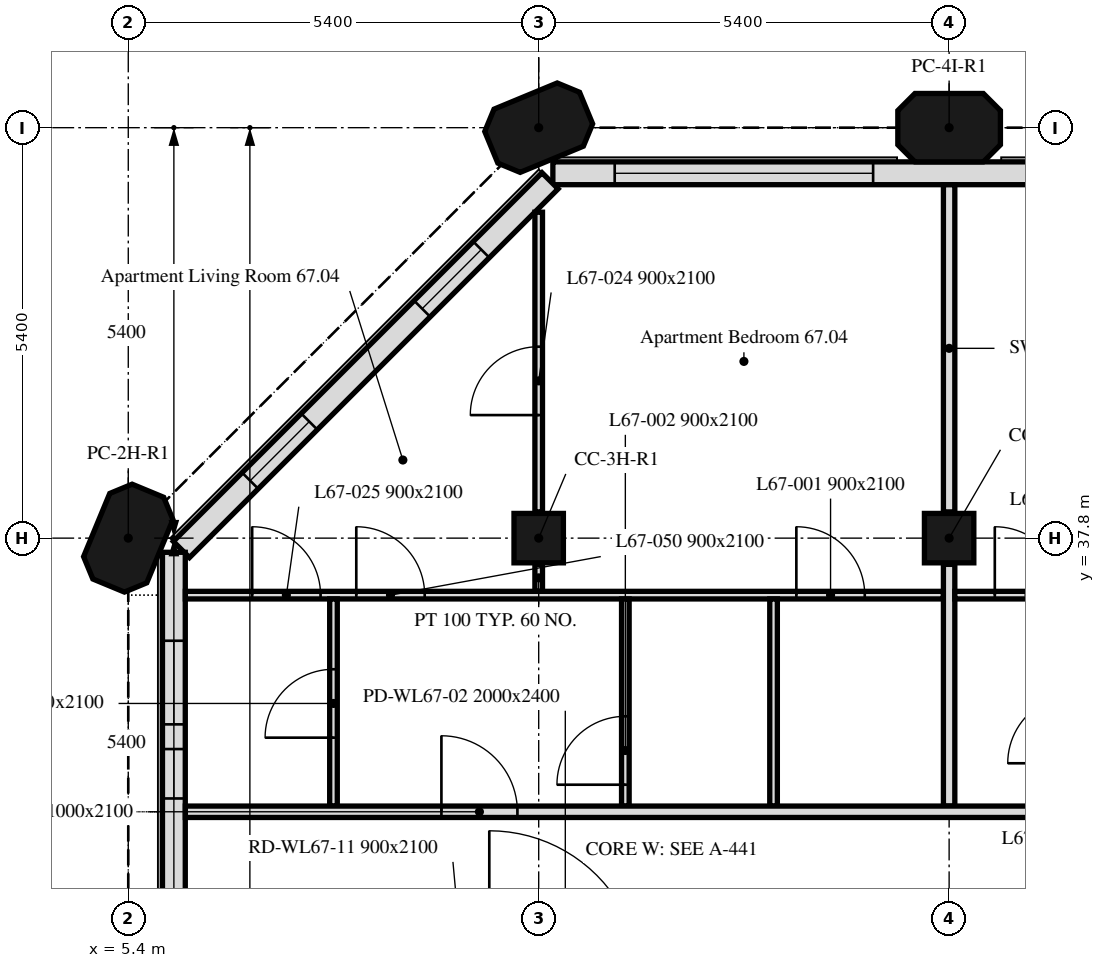
"""IFC4 building model, lengths in metres.
Left out: names, types, materials, properties, quantities, classifications, styles, units other than length and angle.
Written with IfcOpenShell. Run it as: python <this file> out.ifc"""

import sys

from ifc_helpers import new_model, si_unit, direction, frame, frame_2d, origin, origin_2d, place, context, subcontext, project, spatial, polyline, rectangle, outline, extrude, element, fill, save


model = new_model("IFC4")
c1 = context("Model", 3, precision=1e-05, world=origin(), true_north=direction((0.0, 1.0)))
c2 = subcontext(c1, "Body", "Model", "MODEL_VIEW")
j1 = project(units=[si_unit("LENGTHUNIT", "METRE"), si_unit("PLANEANGLEUNIT", "RADIAN")], contexts=[c1])
p1 = place(None, origin())
s1 = spatial("IfcSite", under=j1, at=p1, CompositionType="ELEMENT")
p2 = place(p1, origin())
s2 = spatial("IfcBuilding", under=s1, at=p2, CompositionType="ELEMENT")
p3 = place(p2, frame((0.0, 0.0, 275.2)))
s3 = spatial("IfcBuildingStorey", under=s2, at=p3, CompositionType="ELEMENT", Elevation=275.2)
p4 = place(p3, frame((5.4, 37.8, 0.0), z_axis=(0.0, 0.0, 1.0), x_axis=(0.382683432365, 0.923879532511, 0.0)))
e1 = element("IfcColumn", 1, at=p4, inside=s3, PredefinedType="COLUMN", context=c2, shape_type="SweptSolid", body=[
    extrude(outline(polyline([(-0.45, -0.45), (0.45, -0.45), (0.675, -0.225), (0.675, 0.225), (0.45, 0.45), (-0.45, 0.45), (-0.675, 0.225), (-0.675, -0.225), (-0.45, -0.45)])), origin(), (0.0, 0.0, 1.0), 3.0),
])
for number, where, z_axis, x_axis in (
    (2, (10.8, 37.8, 0.0), (0.0, 0.0, 1.0), (1.0, 0.0, 0.0)),
    (3, (16.2, 37.8, 0.0), (0.0, 0.0, 1.0), (1.0, 0.0, 0.0)),
):
    element("IfcColumn", number, at=place(p3, frame(where, z_axis=z_axis, x_axis=x_axis)), inside=s3, PredefinedType="COLUMN", context=c2, shape_type="SweptSolid", body=[
        extrude(rectangle(XDim=0.65, YDim=0.65, at=origin_2d()), origin(), (0.0, 0.0, 1.0), 3.0),
    ])
for number, where, z_axis, x_axis in (
    (4, (10.8, 43.2, 0.0), (0.0, 0.0, 1.0), (0.924, 0.383, 0.0)),
    (5, (16.2, 43.2, 0.0), (0.0, 0.0, 1.0), (1.0, 0.0, 0.0)),
):
    element("IfcColumn", number, at=place(p3, frame(where, z_axis=z_axis, x_axis=x_axis)), inside=s3, PredefinedType="COLUMN", context=c2, shape_type="SweptSolid", body=[
        extrude(outline(polyline([(-0.45, -0.45), (0.45, -0.45), (0.675, -0.225), (0.675, 0.225), (0.45, 0.45), (-0.45, 0.45), (-0.675, 0.225), (-0.675, -0.225), (-0.45, -0.45)])), origin(), (0.0, 0.0, 1.0), 3.0),
    ])
p5 = place(p3, frame((43.014, 42.6, 0.0), z_axis=(0.0, 0.0, 1.0), x_axis=(-1.0, 0.0, 0.0)))
e6 = element("IfcWall", 6, at=p5, inside=s3, PredefinedType="SOLIDWALL", context=c2, shape_type="SweptSolid", body=[
    extrude(rectangle(XDim=32.027, YDim=0.3, at=frame_2d((16.014, 0.0))), origin(), (0.0, 0.0, 1.0), 3.0),
])
p6 = place(p5, frame((2.764, 0.0, 0.9)))
e7 = element("IfcOpeningElement", 7, at=p6, cuts=e6, PredefinedType="OPENING", context=c2, shape_type="SweptSolid", body=[
    extrude(rectangle(XDim=1.1, YDim=1.7, at=frame_2d((0.55, 0.85))), frame((0.0, 0.16, 0.0), z_axis=(0.0, -1.0, 0.0), x_axis=(1.0, 0.0, 0.0)), (0.0, 0.0, 1.0), 0.32),
])
p7 = place(p5, frame((6.214, 0.0, 0.9)))
e8 = element("IfcOpeningElement", 8, at=p7, cuts=e6, PredefinedType="OPENING", context=c2, shape_type="SweptSolid", body=[
    extrude(rectangle(XDim=3.4, YDim=1.7, at=frame_2d((1.7, 0.85))), frame((0.0, 0.16, 0.0), z_axis=(0.0, -1.0, 0.0), x_axis=(1.0, 0.0, 0.0)), (0.0, 0.0, 1.0), 0.32),
])
p8 = place(p5, frame((13.564, 0.0, 0.9)))
e9 = element("IfcOpeningElement", 9, at=p8, cuts=e6, PredefinedType="OPENING", context=c2, shape_type="SweptSolid", body=[
    extrude(rectangle(XDim=1.1, YDim=1.7, at=frame_2d((0.55, 0.85))), frame((0.0, 0.16, 0.0), z_axis=(0.0, -1.0, 0.0), x_axis=(1.0, 0.0, 0.0)), (0.0, 0.0, 1.0), 0.32),
])
p9 = place(p5, frame((17.014, 0.0, 0.9)))
e10 = element("IfcOpeningElement", 10, at=p9, cuts=e6, PredefinedType="OPENING", context=c2, shape_type="SweptSolid", body=[
    extrude(rectangle(XDim=3.4, YDim=1.7, at=frame_2d((1.7, 0.85))), frame((0.0, 0.16, 0.0), z_axis=(0.0, -1.0, 0.0), x_axis=(1.0, 0.0, 0.0)), (0.0, 0.0, 1.0), 0.32),
])
p10 = place(p5, frame((24.364, 0.0, 0.9)))
e11 = element("IfcOpeningElement", 11, at=p10, cuts=e6, PredefinedType="OPENING", context=c2, shape_type="SweptSolid", body=[
    extrude(rectangle(XDim=1.1, YDim=1.7, at=frame_2d((0.55, 0.85))), frame((0.0, 0.16, 0.0), z_axis=(0.0, -1.0, 0.0), x_axis=(1.0, 0.0, 0.0)), (0.0, 0.0, 1.0), 0.32),
])
p11 = place(p5, frame((27.814, 0.0, 0.9)))
e12 = element("IfcOpeningElement", 12, at=p11, cuts=e6, PredefinedType="OPENING", context=c2, shape_type="SweptSolid", body=[
    extrude(rectangle(XDim=3.4, YDim=1.7, at=frame_2d((1.7, 0.85))), frame((0.0, 0.16, 0.0), z_axis=(0.0, -1.0, 0.0), x_axis=(1.0, 0.0, 0.0)), (0.0, 0.0, 1.0), 0.32),
])
p12 = place(p3, frame((10.949, 42.501, 0.0), z_axis=(0.0, 0.0, 1.0), x_axis=(-0.707106781187, -0.707106781187, 0.0)))
e13 = element("IfcWall", 13, at=p12, inside=s3, PredefinedType="SOLIDWALL", context=c2, shape_type="SweptSolid", body=[
    extrude(rectangle(XDim=6.86, YDim=0.3, at=frame_2d((3.43, 0.0))), origin(), (0.0, 0.0, 1.0), 3.0),
])
p13 = place(p12, frame((1.28, 0.0, 0.9)))
e14 = element("IfcOpeningElement", 14, at=p13, cuts=e13, PredefinedType="OPENING", context=c2, shape_type="SweptSolid", body=[
    extrude(rectangle(XDim=1.1, YDim=1.7, at=frame_2d((0.55, 0.85))), frame((0.0, 0.16, 0.0), z_axis=(0.0, -1.0, 0.0), x_axis=(1.0, 0.0, 0.0)), (0.0, 0.0, 1.0), 0.32),
])
p14 = place(p12, frame((4.48, 0.0, 0.9)))
e15 = element("IfcOpeningElement", 15, at=p14, cuts=e13, PredefinedType="OPENING", context=c2, shape_type="SweptSolid", body=[
    extrude(rectangle(XDim=1.1, YDim=1.7, at=frame_2d((0.55, 0.85))), frame((0.0, 0.16, 0.0), z_axis=(0.0, -1.0, 0.0), x_axis=(1.0, 0.0, 0.0)), (0.0, 0.0, 1.0), 0.32),
])
p15 = place(p3, frame((6.0, 37.614, 0.0), z_axis=(0.0, 0.0, 1.0), x_axis=(0.0, -1.0, 0.0)))
e16 = element("IfcWall", 16, at=p15, inside=s3, PredefinedType="SOLIDWALL", context=c2, shape_type="SweptSolid", body=[
    extrude(rectangle(XDim=5.214, YDim=0.3, at=frame_2d((2.607, 0.0))), origin(), (0.0, 0.0, 1.0), 3.0),
])
p16 = place(p15, frame((1.164, 0.0, 0.9)))
e17 = element("IfcOpeningElement", 17, at=p16, cuts=e16, PredefinedType="OPENING", context=c2, shape_type="SweptSolid", body=[
    extrude(rectangle(XDim=1.1, YDim=1.7, at=frame_2d((0.55, 0.85))), frame((0.0, 0.16, 0.0), z_axis=(0.0, -1.0, 0.0), x_axis=(1.0, 0.0, 0.0)), (0.0, 0.0, 1.0), 0.32),
])
p17 = place(p15, frame((2.589, 0.0, 0.9)))
e18 = element("IfcOpeningElement", 18, at=p17, cuts=e16, PredefinedType="OPENING", context=c2, shape_type="SweptSolid", body=[
    extrude(rectangle(XDim=0.65, YDim=1.7, at=frame_2d((0.325, 0.85))), frame((0.0, 0.16, 0.0), z_axis=(0.0, -1.0, 0.0), x_axis=(1.0, 0.0, 0.0)), (0.0, 0.0, 1.0), 0.32),
])
p18 = place(p3, frame((10.8, 37.1, 0.0), z_axis=(0.0, 0.0, 1.0), x_axis=(0.0, 1.0, 0.0)))
e19 = element("IfcWall", 19, at=p18, inside=s3, PredefinedType="PARTITIONING", context=c2, shape_type="SweptSolid", body=[
    extrude(rectangle(XDim=0.355, YDim=0.1, at=frame_2d((0.177, 0.0))), origin(), (0.0, 0.0, 1.0), 3.0),
])
p19 = place(p3, frame((10.8, 38.145, 0.0), z_axis=(0.0, 0.0, 1.0), x_axis=(0.0, 1.0, 0.0)))
e20 = element("IfcWall", 20, at=p19, inside=s3, PredefinedType="PARTITIONING", context=c2, shape_type="SweptSolid", body=[
    extrude(rectangle(XDim=3.943, YDim=0.1, at=frame_2d((1.971, 0.0))), origin(), (0.0, 0.0, 1.0), 3.0),
])
p20 = place(p19, frame((1.274, 0.0, 0.0)))
e21 = element("IfcOpeningElement", 21, at=p20, cuts=e20, PredefinedType="OPENING", context=c2, shape_type="SweptSolid", body=[
    extrude(rectangle(XDim=0.9, YDim=2.1, at=frame_2d((0.45, 1.05))), frame((0.0, 0.05, 0.0), z_axis=(0.0, -1.0, 0.0), x_axis=(1.0, 0.0, 0.0)), (0.0, 0.0, 1.0), 0.1),
])
p21 = place(p3, frame((6.151, 37.05, 0.0), z_axis=(0.0, 0.0, 1.0), x_axis=(1.0, 0.0, 0.0)))
e22 = element("IfcWall", 22, at=p21, inside=s3, PredefinedType="PARTITIONING", context=c2, shape_type="SweptSolid", body=[
    extrude(rectangle(XDim=9.974, YDim=0.1, at=frame_2d((4.987, 0.0))), origin(), (0.0, 0.0, 1.0), 3.0),
])
p22 = place(p21, frame((8.039, 0.0, 0.0)))
e23 = element("IfcOpeningElement", 23, at=p22, cuts=e22, PredefinedType="OPENING", context=c2, shape_type="SweptSolid", body=[
    extrude(rectangle(XDim=0.9, YDim=2.1, at=frame_2d((0.45, 1.05))), frame((0.0, 0.05, 0.0), z_axis=(0.0, -1.0, 0.0), x_axis=(1.0, 0.0, 0.0)), (0.0, 0.0, 1.0), 0.1),
])
p23 = place(p21, frame((0.879, 0.0, 0.0)))
e24 = element("IfcOpeningElement", 24, at=p23, cuts=e22, PredefinedType="OPENING", context=c2, shape_type="SweptSolid", body=[
    extrude(rectangle(XDim=0.9, YDim=2.1, at=frame_2d((0.45, 1.05))), frame((0.0, 0.05, 0.0), z_axis=(0.0, -1.0, 0.0), x_axis=(1.0, 0.0, 0.0)), (0.0, 0.0, 1.0), 0.1),
])
p24 = place(p21, frame((2.249, 0.0, 0.0)))
e25 = element("IfcOpeningElement", 25, at=p24, cuts=e22, PredefinedType="OPENING", context=c2, shape_type="SweptSolid", body=[
    extrude(rectangle(XDim=0.9, YDim=2.1, at=frame_2d((0.45, 1.05))), frame((0.0, 0.05, 0.0), z_axis=(0.0, -1.0, 0.0), x_axis=(1.0, 0.0, 0.0)), (0.0, 0.0, 1.0), 0.1),
])
p25 = place(p3, frame((16.2, 38.145, 0.0), z_axis=(0.0, 0.0, 1.0), x_axis=(0.0, 1.0, 0.0)))
e26 = element("IfcWall", 26, at=p25, inside=s3, PredefinedType="PARTITIONING", context=c2, shape_type="SweptSolid", body=[
    extrude(rectangle(XDim=4.304, YDim=0.15, at=frame_2d((2.152, 0.0))), origin(), (0.0, 0.0, 1.0), 3.0),
])
p26 = place(p3, frame((8.1, 34.275, 0.0), z_axis=(0.0, 0.0, 1.0), x_axis=(0.0, 1.0, 0.0)))
e27 = element("IfcWall", 27, at=p26, inside=s3, PredefinedType="PARTITIONING", context=c2, shape_type="SweptSolid", body=[
    extrude(rectangle(XDim=2.725, YDim=0.1, at=frame_2d((1.363, 0.0))), origin(), (0.0, 0.0, 1.0), 3.0),
])
p27 = place(p26, frame((0.9, 0.0, 0.0)))
e28 = element("IfcOpeningElement", 28, at=p27, cuts=e27, PredefinedType="OPENING", context=c2, shape_type="SweptSolid", body=[
    extrude(rectangle(XDim=0.9, YDim=2.1, at=frame_2d((0.45, 1.05))), frame((0.0, 0.05, 0.0), z_axis=(0.0, -1.0, 0.0), x_axis=(1.0, 0.0, 0.0)), (0.0, 0.0, 1.0), 0.1),
])
p28 = place(p3, frame((11.94, 34.275, 0.0), z_axis=(0.0, 0.0, 1.0), x_axis=(0.0, 1.0, 0.0)))
e29 = element("IfcWall", 29, at=p28, inside=s3, PredefinedType="PARTITIONING", context=c2, shape_type="SweptSolid", body=[
    extrude(rectangle(XDim=2.725, YDim=0.1, at=frame_2d((1.363, 0.0))), origin(), (0.0, 0.0, 1.0), 3.0),
])
p29 = place(p28, frame((0.281, 0.0, 0.0)))
e30 = element("IfcOpeningElement", 30, at=p29, cuts=e29, PredefinedType="OPENING", context=c2, shape_type="SweptSolid", body=[
    extrude(rectangle(XDim=0.9, YDim=2.1, at=frame_2d((0.45, 1.05))), frame((0.0, 0.05, 0.0), z_axis=(0.0, -1.0, 0.0), x_axis=(1.0, 0.0, 0.0)), (0.0, 0.0, 1.0), 0.1),
])
p30 = place(p3, frame((13.89, 34.275, 0.0), z_axis=(0.0, 0.0, 1.0), x_axis=(0.0, 1.0, 0.0)))
e31 = element("IfcWall", 31, at=p30, inside=s3, PredefinedType="PARTITIONING", context=c2, shape_type="SweptSolid", body=[
    extrude(rectangle(XDim=2.725, YDim=0.1, at=frame_2d((1.363, 0.0))), origin(), (0.0, 0.0, 1.0), 3.0),
])
p31 = place(p3, frame((16.2, 34.275, 0.0), z_axis=(0.0, 0.0, 1.0), x_axis=(0.0, 1.0, 0.0)))
e32 = element("IfcWall", 32, at=p31, inside=s3, PredefinedType="PARTITIONING", context=c2, shape_type="SweptSolid", body=[
    extrude(rectangle(XDim=3.18, YDim=0.15, at=frame_2d((1.59, 0.0))), origin(), (0.0, 0.0, 1.0), 3.0),
])
p32 = place(p3, frame((16.275, 37.05, 0.0), z_axis=(0.0, 0.0, 1.0), x_axis=(1.0, 0.0, 0.0)))
e33 = element("IfcWall", 33, at=p32, inside=s3, PredefinedType="PARTITIONING", context=c2, shape_type="SweptSolid", body=[
    extrude(rectangle(XDim=5.097, YDim=0.1, at=frame_2d((2.549, 0.0))), origin(), (0.0, 0.0, 1.0), 3.0),
])
p33 = place(p32, frame((0.526, 0.0, 0.0)))
e34 = element("IfcOpeningElement", 34, at=p33, cuts=e33, PredefinedType="OPENING", context=c2, shape_type="SweptSolid", body=[
    extrude(rectangle(XDim=0.9, YDim=2.1, at=frame_2d((0.45, 1.05))), frame((0.0, 0.05, 0.0), z_axis=(0.0, -1.0, 0.0), x_axis=(1.0, 0.0, 0.0)), (0.0, 0.0, 1.0), 0.1),
])
p34 = place(p32, frame((2.14, 0.0, 0.0)))
e35 = element("IfcOpeningElement", 35, at=p34, cuts=e33, PredefinedType="OPENING", context=c2, shape_type="SweptSolid", body=[
    extrude(rectangle(XDim=0.9, YDim=2.1, at=frame_2d((0.45, 1.05))), frame((0.0, 0.05, 0.0), z_axis=(0.0, -1.0, 0.0), x_axis=(1.0, 0.0, 0.0)), (0.0, 0.0, 1.0), 0.1),
])
p35 = place(p3, frame((6.151, 34.2, 0.0), z_axis=(0.0, 0.0, 1.0), x_axis=(1.0, 0.0, 0.0)))
e36 = element("IfcWall", 36, at=p35, inside=s3, PredefinedType="PARTITIONING", context=c2, shape_type="SweptSolid", body=[
    extrude(rectangle(XDim=41.698, YDim=0.15, at=frame_2d((20.849, 0.0))), origin(), (0.0, 0.0, 1.0), 3.0),
])
p36 = place(p35, frame((3.369, 0.0, 0.0)))
e37 = element("IfcOpeningElement", 37, at=p36, cuts=e36, PredefinedType="OPENING", context=c2, shape_type="SweptSolid", body=[
    extrude(rectangle(XDim=1.0, YDim=2.1, at=frame_2d((0.5, 1.05))), frame((0.0, 0.075, 0.0), z_axis=(0.0, -1.0, 0.0), x_axis=(1.0, 0.0, 0.0)), (0.0, 0.0, 1.0), 0.15),
])
p37 = place(p35, frame((12.483, 0.0, 0.0)))
e38 = element("IfcOpeningElement", 38, at=p37, cuts=e36, PredefinedType="OPENING", context=c2, shape_type="SweptSolid", body=[
    extrude(rectangle(XDim=1.0, YDim=2.1, at=frame_2d((0.5, 1.05))), frame((0.0, 0.075, 0.0), z_axis=(0.0, -1.0, 0.0), x_axis=(1.0, 0.0, 0.0)), (0.0, 0.0, 1.0), 0.15),
])
p38 = place(p35, frame((24.572, 0.0, 0.0)))
e39 = element("IfcOpeningElement", 39, at=p38, cuts=e36, PredefinedType="OPENING", context=c2, shape_type="SweptSolid", body=[
    extrude(rectangle(XDim=1.0, YDim=2.1, at=frame_2d((0.5, 1.05))), frame((0.0, 0.075, 0.0), z_axis=(0.0, -1.0, 0.0), x_axis=(1.0, 0.0, 0.0)), (0.0, 0.0, 1.0), 0.15),
])
p39 = place(p35, frame((35.849, 0.0, 0.0)))
e40 = element("IfcOpeningElement", 40, at=p39, cuts=e36, PredefinedType="OPENING", context=c2, shape_type="SweptSolid", body=[
    extrude(rectangle(XDim=1.0, YDim=2.1, at=frame_2d((0.5, 1.05))), frame((0.0, 0.075, 0.0), z_axis=(0.0, -1.0, 0.0), x_axis=(1.0, 0.0, 0.0)), (0.0, 0.0, 1.0), 0.15),
])
p40 = place(p11, origin())
e41 = element("IfcWindow", 41, at=p40, inside=s3, PartitioningType="SINGLE_PANEL", PredefinedType="WINDOW", context=c2, shape_type="SweptSolid", body=[
    extrude(rectangle(XDim=3.4, YDim=1.7, at=frame_2d((1.7, 0.85))), frame((0.0, 0.03, 0.0), z_axis=(0.0, -1.0, 0.0), x_axis=(1.0, 0.0, 0.0)), (0.0, 0.0, 1.0), 0.06),
])
fill(e12, e41)
p41 = place(p13, origin())
e42 = element("IfcWindow", 42, at=p41, inside=s3, PartitioningType="SINGLE_PANEL", PredefinedType="WINDOW", context=c2, shape_type="SweptSolid", body=[
    extrude(rectangle(XDim=1.1, YDim=1.7, at=frame_2d((0.55, 0.85))), frame((0.0, 0.03, 0.0), z_axis=(0.0, -1.0, 0.0), x_axis=(1.0, 0.0, 0.0)), (0.0, 0.0, 1.0), 0.06),
])
fill(e14, e42)
p42 = place(p14, origin())
e43 = element("IfcWindow", 43, at=p42, inside=s3, PartitioningType="SINGLE_PANEL", PredefinedType="WINDOW", context=c2, shape_type="SweptSolid", body=[
    extrude(rectangle(XDim=1.1, YDim=1.7, at=frame_2d((0.55, 0.85))), frame((0.0, 0.03, 0.0), z_axis=(0.0, -1.0, 0.0), x_axis=(1.0, 0.0, 0.0)), (0.0, 0.0, 1.0), 0.06),
])
fill(e15, e43)
p43 = place(p16, origin())
e44 = element("IfcWindow", 44, at=p43, inside=s3, PartitioningType="SINGLE_PANEL", PredefinedType="WINDOW", context=c2, shape_type="SweptSolid", body=[
    extrude(rectangle(XDim=1.1, YDim=1.7, at=frame_2d((0.55, 0.85))), frame((0.0, 0.03, 0.0), z_axis=(0.0, -1.0, 0.0), x_axis=(1.0, 0.0, 0.0)), (0.0, 0.0, 1.0), 0.06),
])
fill(e17, e44)
p44 = place(p17, origin())
e45 = element("IfcWindow", 45, at=p44, inside=s3, PartitioningType="SINGLE_PANEL", PredefinedType="WINDOW", context=c2, shape_type="SweptSolid", body=[
    extrude(rectangle(XDim=0.65, YDim=1.7, at=frame_2d((0.325, 0.85))), frame((0.0, 0.03, 0.0), z_axis=(0.0, -1.0, 0.0), x_axis=(1.0, 0.0, 0.0)), (0.0, 0.0, 1.0), 0.06),
])
fill(e18, e45)
p45 = place(p22, origin())
e46 = element("IfcDoor", 46, at=p45, inside=s3, OperationType="SINGLE_SWING_RIGHT", PredefinedType="DOOR", context=c2, shape_type="SweptSolid", body=[
    extrude(rectangle(XDim=0.9, YDim=2.1, at=frame_2d((0.45, 1.05))), frame((0.0, 0.025, 0.0), z_axis=(0.0, -1.0, 0.0), x_axis=(1.0, 0.0, 0.0)), (0.0, 0.0, 1.0), 0.05),
])
fill(e23, e46)
p46 = place(p29, origin())
e47 = element("IfcDoor", 47, at=p46, inside=s3, OperationType="SINGLE_SWING_LEFT", PredefinedType="DOOR", context=c2, shape_type="SweptSolid", body=[
    extrude(rectangle(XDim=0.9, YDim=2.1, at=frame_2d((0.45, 1.05))), frame((0.0, 0.025, 0.0), z_axis=(0.0, -1.0, 0.0), x_axis=(1.0, 0.0, 0.0)), (0.0, 0.0, 1.0), 0.05),
])
fill(e30, e47)
p47 = place(p20, origin())
e48 = element("IfcDoor", 48, at=p47, inside=s3, OperationType="SINGLE_SWING_RIGHT", PredefinedType="DOOR", context=c2, shape_type="SweptSolid", body=[
    extrude(rectangle(XDim=0.9, YDim=2.1, at=frame_2d((0.45, 1.05))), frame((0.0, 0.025, 0.0), z_axis=(0.0, -1.0, 0.0), x_axis=(1.0, 0.0, 0.0)), (0.0, 0.0, 1.0), 0.05),
])
fill(e21, e48)
p48 = place(p23, origin())
e49 = element("IfcDoor", 49, at=p48, inside=s3, OperationType="SINGLE_SWING_LEFT", PredefinedType="DOOR", context=c2, shape_type="SweptSolid", body=[
    extrude(rectangle(XDim=0.9, YDim=2.1, at=frame_2d((0.45, 1.05))), frame((0.0, 0.025, 0.0), z_axis=(0.0, -1.0, 0.0), x_axis=(1.0, 0.0, 0.0)), (0.0, 0.0, 1.0), 0.05),
])
fill(e24, e49)
p49 = place(p27, origin())
e50 = element("IfcDoor", 50, at=p49, inside=s3, OperationType="SINGLE_SWING_LEFT", PredefinedType="DOOR", context=c2, shape_type="SweptSolid", body=[
    extrude(rectangle(XDim=0.9, YDim=2.1, at=frame_2d((0.45, 1.05))), frame((0.0, 0.025, 0.0), z_axis=(0.0, -1.0, 0.0), x_axis=(1.0, 0.0, 0.0)), (0.0, 0.0, 1.0), 0.05),
])
fill(e28, e50)
p50 = place(p33, origin())
e51 = element("IfcDoor", 51, at=p50, inside=s3, OperationType="SINGLE_SWING_LEFT", PredefinedType="DOOR", context=c2, shape_type="SweptSolid", body=[
    extrude(rectangle(XDim=0.9, YDim=2.1, at=frame_2d((0.45, 1.05))), frame((0.0, 0.025, 0.0), z_axis=(0.0, -1.0, 0.0), x_axis=(1.0, 0.0, 0.0)), (0.0, 0.0, 1.0), 0.05),
])
fill(e34, e51)
p51 = place(p24, origin())
e52 = element("IfcDoor", 52, at=p51, inside=s3, OperationType="SINGLE_SWING_RIGHT", PredefinedType="DOOR", context=c2, shape_type="SweptSolid", body=[
    extrude(rectangle(XDim=0.9, YDim=2.1, at=frame_2d((0.45, 1.05))), frame((0.0, 0.025, 0.0), z_axis=(0.0, -1.0, 0.0), x_axis=(1.0, 0.0, 0.0)), (0.0, 0.0, 1.0), 0.05),
])
fill(e25, e52)
p52 = place(p36, origin())
e53 = element("IfcDoor", 53, at=p52, inside=s3, OperationType="SINGLE_SWING_RIGHT", PredefinedType="DOOR", context=c2, shape_type="SweptSolid", body=[
    extrude(rectangle(XDim=1.0, YDim=2.1, at=frame_2d((0.5, 1.05))), frame((0.0, 0.025, 0.0), z_axis=(0.0, -1.0, 0.0), x_axis=(1.0, 0.0, 0.0)), (0.0, 0.0, 1.0), 0.05),
])
fill(e37, e53)
save(model, sys.argv[1])
